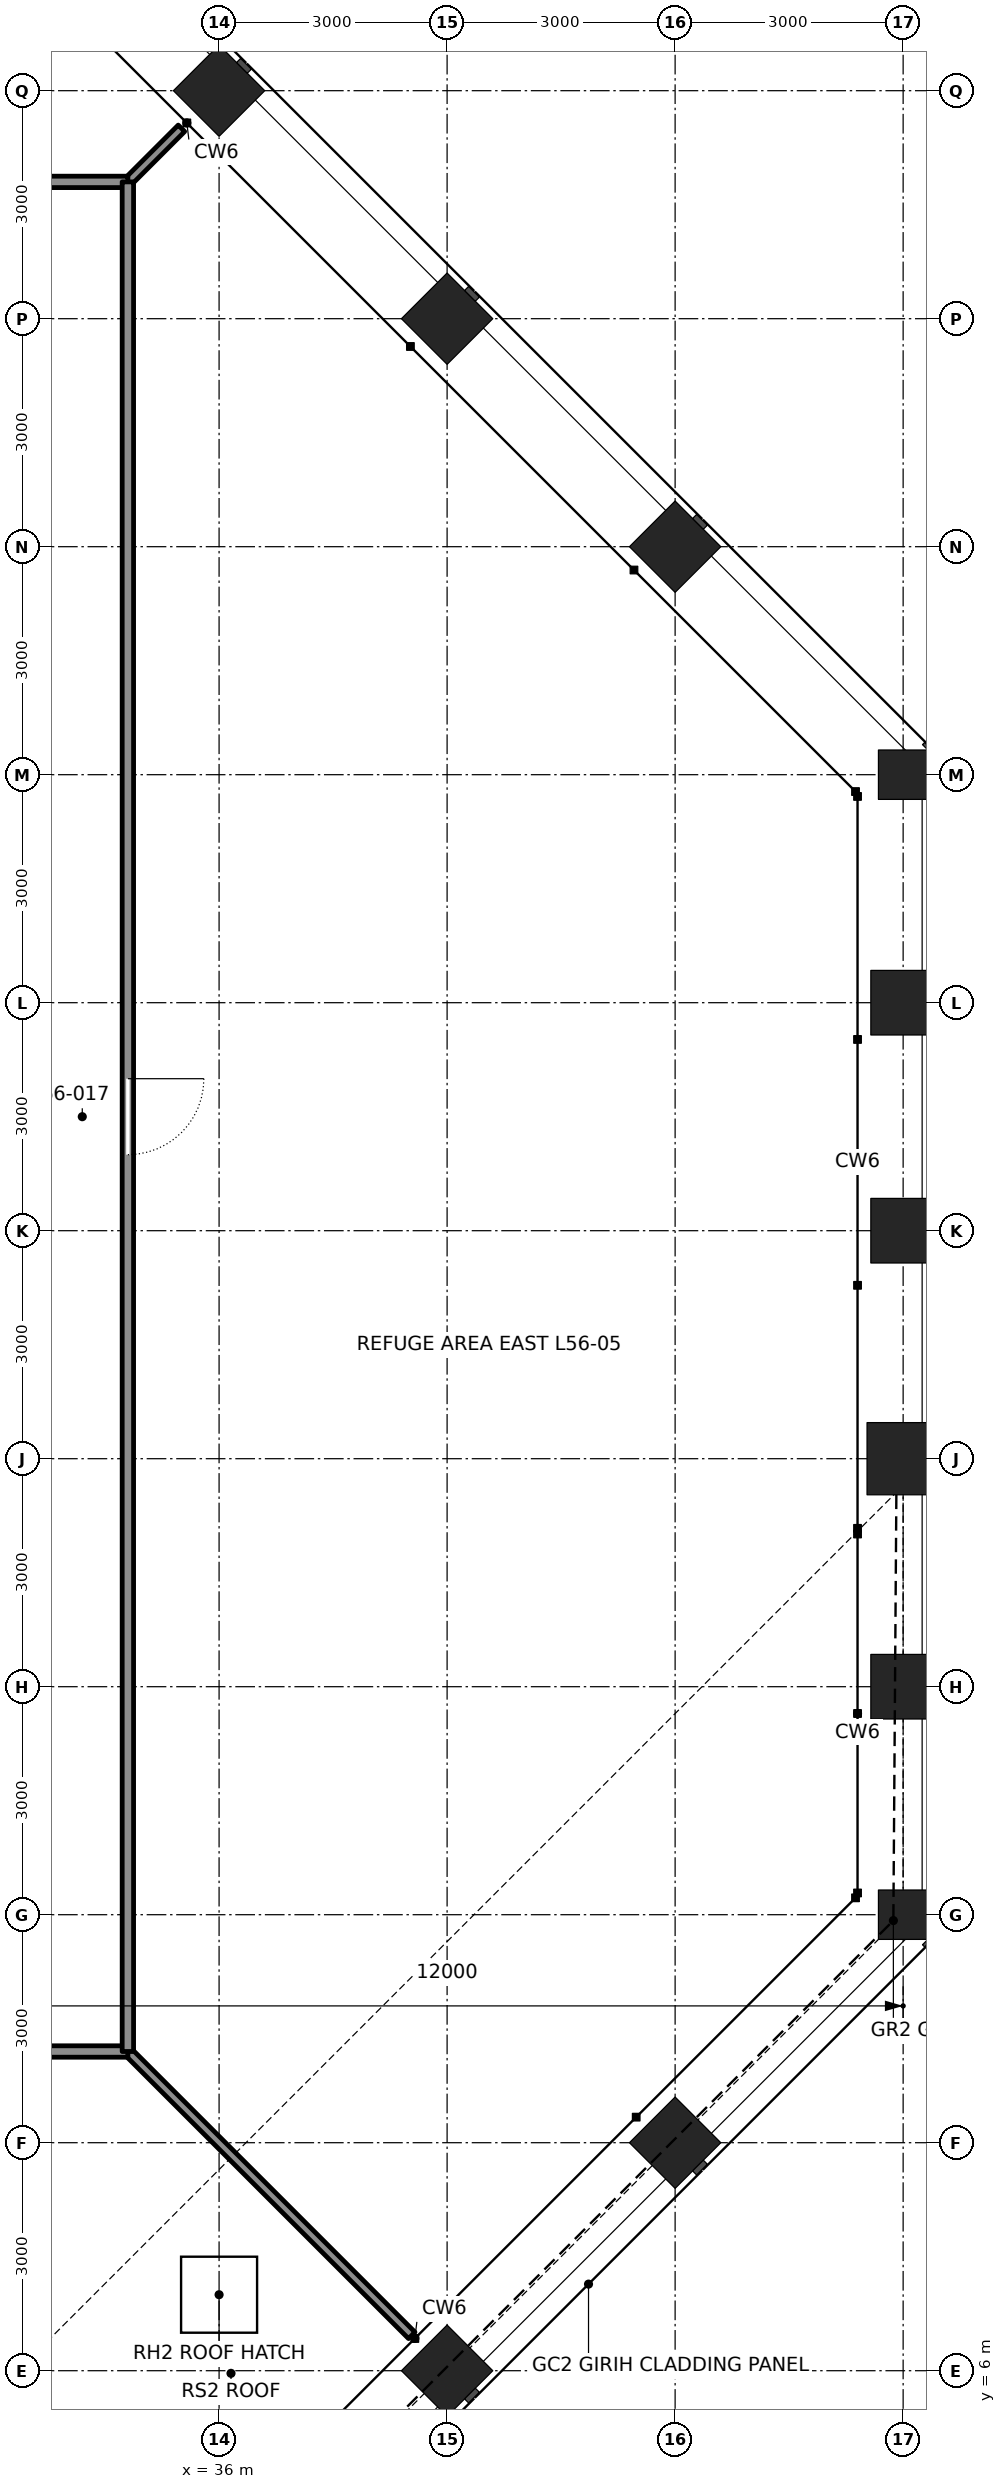
"""IFC4 building model, lengths in metres.
Left out: names, types, materials, properties, quantities, classifications, styles, units other than length and angle.
Written with IfcOpenShell. Run it as: python <this file> out.ifc"""

import sys

from ifc_helpers import new_model, si_unit, direction, frame, frame_2d, origin, origin_2d, place, context, subcontext, project, spatial, rectangle, hollow_rectangle, extrude, element, fill, save


model = new_model("IFC4")
c1 = context("Model", 3, precision=1e-05, world=origin(), true_north=direction((0.0, 1.0)))
c2 = subcontext(c1, "Body", "Model", "MODEL_VIEW")
j1 = project(units=[si_unit("LENGTHUNIT", "METRE"), si_unit("PLANEANGLEUNIT", "RADIAN")], contexts=[c1])
p1 = place(None, origin())
s1 = spatial("IfcSite", under=j1, at=p1, CompositionType="ELEMENT")
p2 = place(p1, origin())
s2 = spatial("IfcBuilding", under=s1, at=p2, CompositionType="ELEMENT")
p3 = place(p2, frame((0.0, 0.0, 251.7)))
s3 = spatial("IfcBuildingStorey", under=s2, at=p3, CompositionType="ELEMENT", Elevation=251.7)
for number, where, z_axis, x_axis in (
    (1, (39.0, 6.0, 0.0), (0.0, 0.0, 1.0), (0.707, -0.707, 0.0)),
    (2, (42.0, 9.0, 0.0), (0.0, 0.0, 1.0), (0.707, -0.707, 0.0)),
):
    element("IfcColumn", number, at=place(p3, frame(where, z_axis=z_axis, x_axis=x_axis)), inside=s3, PredefinedType="COLUMN", context=c2, shape_type="SweptSolid", body=[
        extrude(hollow_rectangle(XDim=0.85, YDim=0.85, WallThickness=0.085, at=origin_2d()), origin(), (0.0, 0.0, 1.0), 3.698),
    ])
p4 = place(p3, frame((45.0, 12.0, 0.0), z_axis=(0.0, 0.0, 1.0), x_axis=(1.0, 0.0, 0.0)))
e3 = element("IfcColumn", 3, at=p4, inside=s3, PredefinedType="COLUMN", context=c2, shape_type="SweptSolid", body=[
    extrude(hollow_rectangle(XDim=0.65, YDim=0.65, WallThickness=0.065, at=origin_2d()), origin(), (0.0, 0.0, 1.0), 3.698),
])
p5 = place(p3, frame((45.0, 15.0, 0.0), z_axis=(0.0, 0.0, 1.0), x_axis=(1.0, 0.0, 0.0)))
e4 = element("IfcColumn", 4, at=p5, inside=s3, PredefinedType="COLUMN", context=c2, shape_type="SweptSolid", body=[
    extrude(hollow_rectangle(XDim=0.85, YDim=0.85, WallThickness=0.085, at=origin_2d()), origin(), (0.0, 0.0, 1.0), 4.149),
])
p6 = place(p3, frame((45.0, 18.0, 0.0), z_axis=(0.0, 0.0, 1.0), x_axis=(1.0, 0.0, 0.0)))
e5 = element("IfcColumn", 5, at=p6, inside=s3, PredefinedType="COLUMN", context=c2, shape_type="SweptSolid", body=[
    extrude(hollow_rectangle(XDim=0.95, YDim=0.95, WallThickness=0.11, at=origin_2d()), origin(), (0.0, 0.0, 1.0), 6.0),
])
for number, where, z_axis, x_axis in (
    (6, (45.0, 21.0, 0.0), (0.0, 0.0, 1.0), (1.0, 0.0, 0.0)),
    (7, (45.0, 24.0, 0.0), (0.0, 0.0, 1.0), (1.0, 0.0, 0.0)),
):
    element("IfcColumn", number, at=place(p3, frame(where, z_axis=z_axis, x_axis=x_axis)), inside=s3, PredefinedType="COLUMN", context=c2, shape_type="SweptSolid", body=[
        extrude(hollow_rectangle(XDim=0.85, YDim=0.85, WallThickness=0.085, at=origin_2d()), origin(), (0.0, 0.0, 1.0), 6.0),
    ])
p7 = place(p3, frame((45.0, 27.0, 0.0), z_axis=(0.0, 0.0, 1.0), x_axis=(1.0, 0.0, 0.0)))
e8 = element("IfcColumn", 8, at=p7, inside=s3, PredefinedType="COLUMN", context=c2, shape_type="SweptSolid", body=[
    extrude(hollow_rectangle(XDim=0.65, YDim=0.65, WallThickness=0.065, at=origin_2d()), origin(), (0.0, 0.0, 1.0), 6.0),
])
for number, where, z_axis, x_axis in (
    (9, (42.0, 30.0, 0.0), (0.0, 0.0, 1.0), (0.707, 0.707, 0.0)),
    (10, (39.0, 33.0, 0.0), (0.0, 0.0, 1.0), (0.707, 0.707, 0.0)),
    (11, (36.0, 36.0, 0.0), (0.0, 0.0, 1.0), (0.707, 0.707, 0.0)),
):
    element("IfcColumn", number, at=place(p3, frame(where, z_axis=z_axis, x_axis=x_axis)), inside=s3, PredefinedType="COLUMN", context=c2, shape_type="SweptSolid", body=[
        extrude(hollow_rectangle(XDim=0.85, YDim=0.85, WallThickness=0.085, at=origin_2d()), origin(), (0.0, 0.0, 1.0), 6.0),
    ])
p8 = place(p3, frame((34.8, 34.8, 0.0), z_axis=(0.0, 0.0, 1.0), x_axis=(0.707106781187, 0.707106781187, 0.0)))
e12 = element("IfcWall", 12, at=p8, inside=s3, PredefinedType="PARTITIONING", context=c2, shape_type="SweptSolid", body=[
    extrude(rectangle(XDim=0.997, YDim=0.12, at=frame_2d((0.499, 0.0))), origin(), (0.0, 0.0, 1.0), 5.84),
])
p9 = place(p3, frame((34.8, 10.2, 0.0), z_axis=(0.0, 0.0, 1.0), x_axis=(0.707106781187, -0.707106781187, 0.0)))
e13 = element("IfcWall", 13, at=p9, inside=s3, PredefinedType="PARTITIONING", context=c2, shape_type="SweptSolid", body=[
    extrude(rectangle(XDim=5.282, YDim=0.12, at=frame_2d((2.641, 0.0))), origin(), (0.0, 0.0, 1.0), 5.84),
])
p10 = place(p3, frame((10.2, 10.2, 0.0), z_axis=(0.0, 0.0, 1.0), x_axis=(1.0, 0.0, 0.0)))
e14 = element("IfcWall", 14, at=p10, inside=s3, PredefinedType="PARTITIONING", context=c2, shape_type="SweptSolid", body=[
    extrude(rectangle(XDim=24.6, YDim=0.15, at=frame_2d((12.3, 0.0))), origin(), (0.0, 0.0, 1.0), 5.84),
])
p11 = place(p10, frame((11.8, 0.0, 0.0)))
e15 = element("IfcOpeningElement", 15, at=p11, cuts=e14, PredefinedType="OPENING", context=c2, shape_type="SweptSolid", body=[
    extrude(rectangle(XDim=1.0, YDim=2.4, at=frame_2d((0.5, 1.2))), frame((0.0, 0.085, 0.0), z_axis=(0.0, -1.0, 0.0), x_axis=(1.0, 0.0, 0.0)), (0.0, 0.0, 1.0), 0.17),
])
p12 = place(p3, frame((10.2, 34.8, 0.0), z_axis=(0.0, 0.0, 1.0), x_axis=(1.0, 0.0, 0.0)))
e16 = element("IfcWall", 16, at=p12, inside=s3, PredefinedType="PARTITIONING", context=c2, shape_type="SweptSolid", body=[
    extrude(rectangle(XDim=24.6, YDim=0.15, at=frame_2d((12.3, 0.0))), origin(), (0.0, 0.0, 1.0), 5.84),
])
p13 = place(p12, frame((11.8, 0.0, 0.0)))
e17 = element("IfcOpeningElement", 17, at=p13, cuts=e16, PredefinedType="OPENING", context=c2, shape_type="SweptSolid", body=[
    extrude(rectangle(XDim=1.0, YDim=2.4, at=frame_2d((0.5, 1.2))), frame((0.0, 0.085, 0.0), z_axis=(0.0, -1.0, 0.0), x_axis=(1.0, 0.0, 0.0)), (0.0, 0.0, 1.0), 0.17),
])
p14 = place(p3, frame((34.8, 10.2, 0.0), z_axis=(0.0, 0.0, 1.0), x_axis=(0.0, 1.0, 0.0)))
e18 = element("IfcWall", 18, at=p14, inside=s3, PredefinedType="PARTITIONING", context=c2, shape_type="SweptSolid", body=[
    extrude(rectangle(XDim=24.6, YDim=0.15, at=frame_2d((12.3, 0.0))), origin(), (0.0, 0.0, 1.0), 5.84),
])
p15 = place(p14, frame((11.8, 0.0, 0.0)))
e19 = element("IfcOpeningElement", 19, at=p15, cuts=e18, PredefinedType="OPENING", context=c2, shape_type="SweptSolid", body=[
    extrude(rectangle(XDim=1.0, YDim=2.4, at=frame_2d((0.5, 1.2))), frame((0.0, 0.085, 0.0), z_axis=(0.0, -1.0, 0.0), x_axis=(1.0, 0.0, 0.0)), (0.0, 0.0, 1.0), 0.17),
])
p16 = place(p3, frame((36.0, 7.0, 5.195)))
p17 = place(p16, frame((0.0, 0.0, 0.454)))
e20 = element("IfcDoor", 20, at=p17, inside=s3, OperationType="SINGLE_SWING_LEFT", PredefinedType="TRAPDOOR", context=c2, shape_type="SweptSolid", body=[
    extrude(rectangle(XDim=1.0, YDim=1.0, at=origin_2d()), origin(), (0.0, 0.0, 1.0), 0.05),
])
p18 = place(p15, frame((1.0, 0.0, 0.0), z_axis=(0.0, 0.0, 1.0), x_axis=(-1.0, 0.0, 0.0)))
e21 = element("IfcDoor", 21, at=p18, inside=s3, OperationType="SINGLE_SWING_LEFT", PredefinedType="DOOR", context=c2, shape_type="SweptSolid", body=[
    extrude(rectangle(XDim=1.0, YDim=2.4, at=frame_2d((0.5, 1.2))), frame((0.0, 0.025, 0.0), z_axis=(0.0, -1.0, 0.0), x_axis=(1.0, 0.0, 0.0)), (0.0, 0.0, 1.0), 0.05),
])
fill(e19, e21)
save(model, sys.argv[1])
